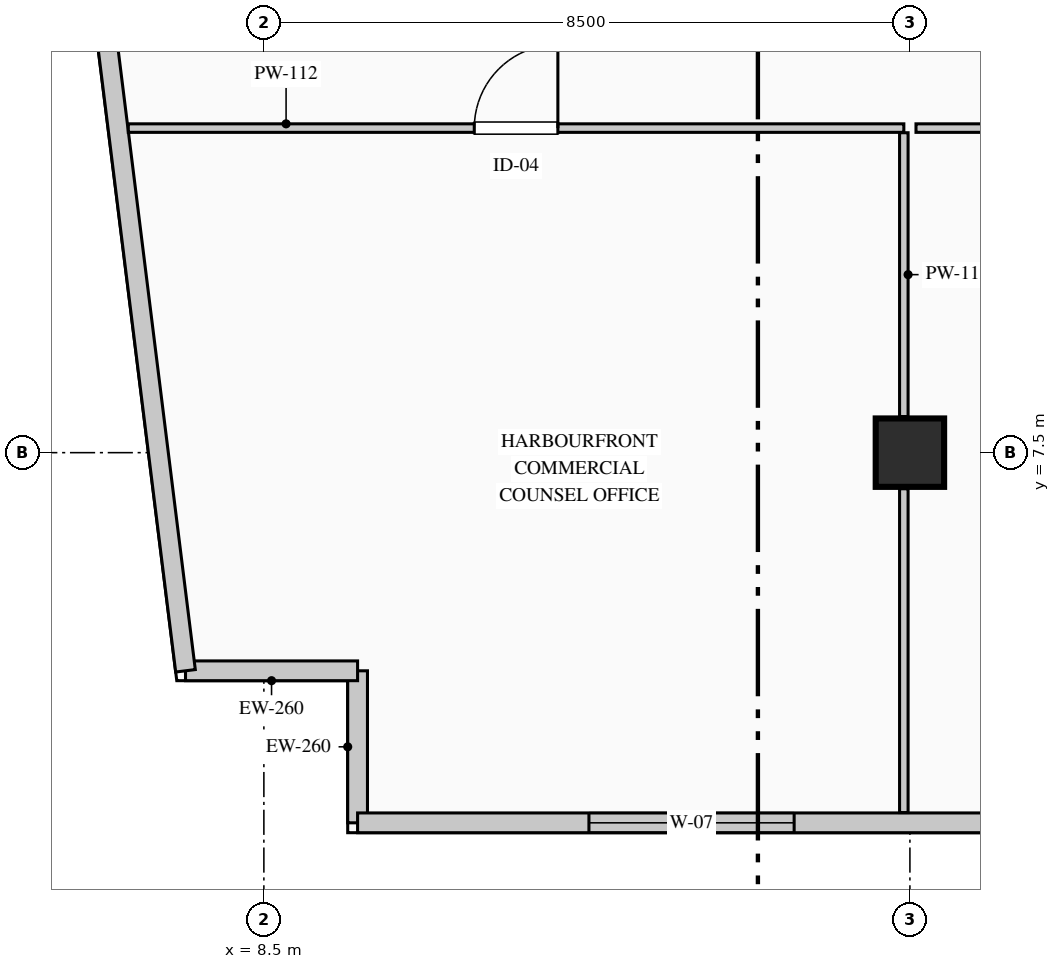
"""IFC4 building model, lengths in metres.
Left out: names, types, materials, properties, quantities, classifications, styles, units other than length and angle.
Written with IfcOpenShell. Run it as: python <this file> out.ifc"""

import sys

from ifc_helpers import new_model, si_unit, direction, frame, frame_2d, origin, origin_2d, place, context, subcontext, project, spatial, rectangle, extrude, element, fill, save


model = new_model("IFC4")
c1 = context("Model", 3, precision=1e-05, world=origin(), true_north=direction((0.0, 1.0)))
c2 = subcontext(c1, "Body", "Model", "MODEL_VIEW")
j1 = project(units=[si_unit("LENGTHUNIT", "METRE"), si_unit("PLANEANGLEUNIT", "RADIAN")], contexts=[c1])
p1 = place(None, origin())
s1 = spatial("IfcSite", under=j1, at=p1, CompositionType="ELEMENT")
p2 = place(p1, origin())
s2 = spatial("IfcBuilding", under=s1, at=p2, CompositionType="ELEMENT")
p3 = place(p2, frame((0.0, 0.0, 187.7)))
s3 = spatial("IfcBuildingStorey", under=s2, at=p3, CompositionType="ELEMENT", Elevation=187.7)
p4 = place(p3, frame((17.0, 7.5, 0.0), z_axis=(0.0, 0.0, 1.0), x_axis=(1.0, 0.0, 0.0)))
e1 = element("IfcColumn", 1, at=p4, inside=s3, PredefinedType="COLUMN", context=c2, shape_type="SweptSolid", body=[
    extrude(rectangle(XDim=0.9, YDim=0.9, at=origin_2d()), origin(), (0.0, 0.0, 1.0), 3.95),
])
p5 = place(p3, frame((9.733, 2.63, 0.0), z_axis=(0.0, 0.0, 1.0), x_axis=(0.0, 1.0, 0.0)))
e2 = element("IfcWall", 2, at=p5, inside=s3, PredefinedType="STANDARD", context=c2, shape_type="SweptSolid", body=[
    extrude(rectangle(XDim=2.0, YDim=0.26, at=frame_2d((1.0, 0.0))), origin(), (0.0, 0.0, 1.0), 3.7),
])
p6 = place(p3, frame((9.733, 4.63, 0.0), z_axis=(0.0, 0.0, 1.0), x_axis=(-1.0, 0.0, 0.0)))
e3 = element("IfcWall", 3, at=p6, inside=s3, PredefinedType="STANDARD", context=c2, shape_type="SweptSolid", body=[
    extrude(rectangle(XDim=2.264, YDim=0.26, at=frame_2d((1.132, 0.0))), origin(), (0.0, 0.0, 1.0), 3.7),
])
p7 = place(p3, frame((7.469, 4.63, 0.0), z_axis=(0.0, 0.0, 1.0), x_axis=(-0.123515300309, 0.992342667928, 0.0)))
e4 = element("IfcWall", 4, at=p7, inside=s3, PredefinedType="STANDARD", context=c2, shape_type="SweptSolid", body=[
    extrude(rectangle(XDim=37.024, YDim=0.26, at=frame_2d((18.512, 0.0))), origin(), (0.0, 0.0, 1.0), 3.7),
])
p8 = place(p7, frame((11.978, 0.0, 0.9)))
e5 = element("IfcOpeningElement", 5, at=p8, cuts=e4, PredefinedType="OPENING", context=c2, shape_type="SweptSolid", body=[
    extrude(rectangle(XDim=2.7, YDim=2.1, at=frame_2d((1.35, 1.05))), frame((0.0, 0.14, 0.0), z_axis=(0.0, -1.0, 0.0), x_axis=(1.0, 0.0, 0.0)), (0.0, 0.0, 1.0), 0.28),
])
p9 = place(p3, frame((21.937, 2.63, 0.0), z_axis=(0.0, 0.0, 1.0), x_axis=(-1.0, 0.0, 0.0)))
e6 = element("IfcWall", 6, at=p9, inside=s3, PredefinedType="STANDARD", context=c2, shape_type="SweptSolid", body=[
    extrude(rectangle(XDim=12.204, YDim=0.26, at=frame_2d((6.102, 0.0))), origin(), (0.0, 0.0, 1.0), 3.7),
])
p10 = place(p9, frame((6.46, 0.0, 0.9)))
e7 = element("IfcOpeningElement", 7, at=p10, cuts=e6, PredefinedType="OPENING", context=c2, shape_type="SweptSolid", body=[
    extrude(rectangle(XDim=2.7, YDim=2.1, at=frame_2d((1.35, 1.05))), frame((0.0, 0.14, 0.0), z_axis=(0.0, -1.0, 0.0), x_axis=(1.0, 0.0, 0.0)), (0.0, 0.0, 1.0), 0.28),
])
p11 = place(p3, frame((6.716, 11.77, 0.0), z_axis=(0.0, 0.0, 1.0), x_axis=(1.0, 0.0, 0.0)))
e8 = element("IfcWall", 8, at=p11, inside=s3, PredefinedType="PARTITIONING", context=c2, shape_type="SweptSolid", body=[
    extrude(rectangle(XDim=10.204, YDim=0.112, at=frame_2d((5.102, 0.0))), origin(), (0.0, 0.0, 1.0), 3.7),
])
p12 = place(p11, frame((4.552, 0.0, 0.0)))
e9 = element("IfcOpeningElement", 9, at=p12, cuts=e8, PredefinedType="OPENING", context=c2, shape_type="SweptSolid", body=[
    extrude(rectangle(XDim=1.1, YDim=2.2, at=frame_2d((0.55, 1.1))), frame((0.0, 0.066, 0.0), z_axis=(0.0, -1.0, 0.0), x_axis=(1.0, 0.0, 0.0)), (0.0, 0.0, 1.0), 0.132),
])
p13 = place(p3, frame((16.92, 11.709, 0.0), z_axis=(0.0, 0.0, 1.0), x_axis=(0.0, -1.0, 0.0)))
e10 = element("IfcWall", 10, at=p13, inside=s3, PredefinedType="PARTITIONING", context=c2, shape_type="SweptSolid", body=[
    extrude(rectangle(XDim=3.734, YDim=0.112, at=frame_2d((1.867, 0.0))), origin(), (0.0, 0.0, 1.0), 3.085),
])
p14 = place(p3, frame((16.92, 7.025, 0.0), z_axis=(0.0, 0.0, 1.0), x_axis=(0.0, -1.0, 0.0)))
e11 = element("IfcWall", 11, at=p14, inside=s3, PredefinedType="PARTITIONING", context=c2, shape_type="SweptSolid", body=[
    extrude(rectangle(XDim=4.26, YDim=0.112, at=frame_2d((2.13, 0.0))), origin(), (0.0, 0.0, 1.0), 3.7),
])
p15 = place(p3, frame((17.08, 11.77, 0.0), z_axis=(0.0, 0.0, 1.0), x_axis=(1.0, 0.0, 0.0)))
e12 = element("IfcWall", 12, at=p15, inside=s3, PredefinedType="PARTITIONING", context=c2, shape_type="SweptSolid", body=[
    extrude(rectangle(XDim=5.435, YDim=0.112, at=frame_2d((2.717, 0.0))), origin(), (0.0, 0.0, 1.0), 3.7),
])
p16 = place(p15, frame((1.512, 0.0, 0.0)))
e13 = element("IfcOpeningElement", 13, at=p16, cuts=e12, PredefinedType="OPENING", context=c2, shape_type="SweptSolid", body=[
    extrude(rectangle(XDim=1.1, YDim=2.2, at=frame_2d((0.55, 1.1))), frame((0.0, 0.066, 0.0), z_axis=(0.0, -1.0, 0.0), x_axis=(1.0, 0.0, 0.0)), (0.0, 0.0, 1.0), 0.132),
])
p17 = place(p10, origin())
e14 = element("IfcWindow", 14, at=p17, inside=s3, PartitioningType="DOUBLE_PANEL_VERTICAL", PredefinedType="WINDOW", context=c2, shape_type="SweptSolid", body=[
    extrude(rectangle(XDim=2.7, YDim=2.1, at=frame_2d((1.35, 1.05))), frame((0.0, 0.03, 0.0), z_axis=(0.0, -1.0, 0.0), x_axis=(1.0, 0.0, 0.0)), (0.0, 0.0, 1.0), 0.06),
])
fill(e7, e14)
p18 = place(p12, origin())
e15 = element("IfcDoor", 15, at=p18, inside=s3, OperationType="SINGLE_SWING_RIGHT", PredefinedType="DOOR", context=c2, shape_type="SweptSolid", body=[
    extrude(rectangle(XDim=1.1, YDim=2.2, at=frame_2d((0.55, 1.1))), frame((0.0, 0.025, 0.0), z_axis=(0.0, -1.0, 0.0), x_axis=(1.0, 0.0, 0.0)), (0.0, 0.0, 1.0), 0.05),
])
fill(e9, e15)
save(model, sys.argv[1])
